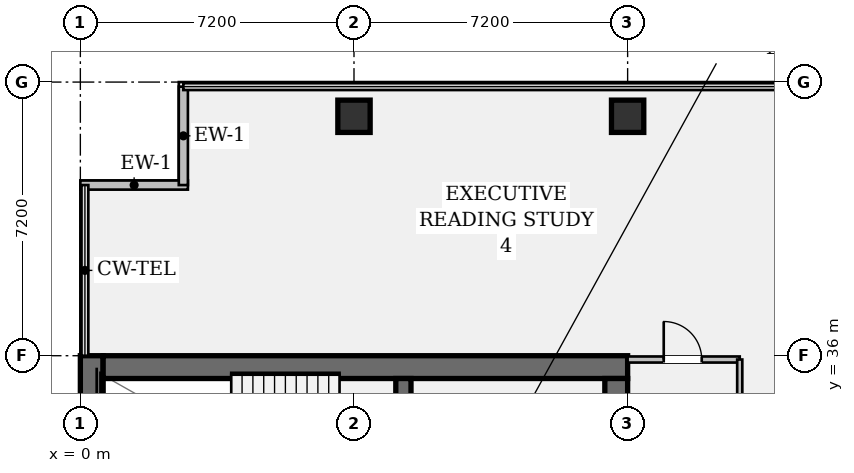
"""IFC4 building model, lengths in metres.
Left out: names, types, materials, properties, quantities, classifications, styles, units other than length and angle.
Written with IfcOpenShell. Run it as: python <this file> out.ifc"""

import sys

from ifc_helpers import new_model, si_unit, direction, frame, frame_2d, origin, origin_2d, place, context, subcontext, project, spatial, rectangle, hollow_rectangle, extrude, element, fill, save


model = new_model("IFC4")
c1 = context("Model", 3, precision=1e-05, world=origin(), true_north=direction((0.0, 1.0)))
c2 = subcontext(c1, "Body", "Model", "MODEL_VIEW")
j1 = project(units=[si_unit("LENGTHUNIT", "METRE"), si_unit("PLANEANGLEUNIT", "RADIAN")], contexts=[c1])
p1 = place(None, origin())
s1 = spatial("IfcSite", under=j1, at=p1, CompositionType="ELEMENT")
p2 = place(p1, origin())
s2 = spatial("IfcBuilding", under=s1, at=p2, CompositionType="ELEMENT")
p3 = place(p2, frame((0.0, 0.0, 148.4)))
s3 = spatial("IfcBuildingStorey", under=s2, at=p3, CompositionType="ELEMENT", Elevation=148.4)
p4 = place(p3, frame((0.3, 7.2, 0.0), z_axis=(0.0, 0.0, 1.0), x_axis=(0.0, 1.0, 0.0)))
e1 = element("IfcWall", 1, at=p4, inside=s3, PredefinedType="SHEAR", context=c2, shape_type="SweptSolid", body=[
    extrude(rectangle(XDim=28.8, YDim=0.6, at=frame_2d((14.4, 0.0))), origin(), (0.0, 0.0, 1.0), 3.58),
])
p5 = place(p3, frame((0.6, 35.7, 0.0), z_axis=(0.0, 0.0, 1.0), x_axis=(1.0, 0.0, 0.0)))
e2 = element("IfcWall", 2, at=p5, inside=s3, PredefinedType="SHEAR", context=c2, shape_type="SweptSolid", body=[
    extrude(rectangle(XDim=13.8, YDim=0.6, at=frame_2d((6.9, 0.0))), origin(), (0.0, 0.0, 1.0), 3.58),
])
p6 = place(p3, frame((14.1, 35.4, 0.0), z_axis=(0.0, 0.0, 1.0), x_axis=(0.0, -1.0, 0.0)))
e3 = element("IfcWall", 3, at=p6, inside=s3, PredefinedType="SHEAR", context=c2, shape_type="SweptSolid", body=[
    extrude(rectangle(XDim=27.6, YDim=0.6, at=frame_2d((13.8, 0.0))), origin(), (0.0, 0.0, 1.0), 3.58),
])
p7 = place(p6, frame((1.3, 0.0, 0.0)))
e4 = element("IfcOpeningElement", 4, at=p7, cuts=e3, PredefinedType="OPENING", context=c2, shape_type="SweptSolid", body=[
    extrude(rectangle(XDim=1.2, YDim=2.15, at=frame_2d((0.6, 1.075))), frame((0.0, 0.312, 0.0), z_axis=(0.0, -1.0, 0.0), x_axis=(1.0, 0.0, 0.0)), (0.0, 0.0, 1.0), 0.624),
])
p8 = place(p6, frame((25.25, 0.0, 0.0)))
e5 = element("IfcOpeningElement", 5, at=p8, cuts=e3, PredefinedType="OPENING", context=c2, shape_type="SweptSolid", body=[
    extrude(rectangle(XDim=1.2, YDim=2.15, at=frame_2d((0.6, 1.075))), frame((0.0, 0.312, 0.0), z_axis=(0.0, -1.0, 0.0), x_axis=(1.0, 0.0, 0.0)), (0.0, 0.0, 1.0), 0.624),
])
p9 = place(p6, frame((14.6, 0.0, 0.0)))
e6 = element("IfcOpeningElement", 6, at=p9, cuts=e3, PredefinedType="OPENING", context=c2, shape_type="SweptSolid", body=[
    extrude(rectangle(XDim=1.6, YDim=2.2, at=frame_2d((0.8, 1.1))), frame((0.0, 0.312, 0.0), z_axis=(0.0, -1.0, 0.0), x_axis=(1.0, 0.0, 0.0)), (0.0, 0.0, 1.0), 0.624),
])
p10 = place(p3, frame((8.5, 31.72, 0.0), z_axis=(0.0, 0.0, 1.0), x_axis=(0.0, 1.0, 0.0)))
e7 = element("IfcWall", 7, at=p10, inside=s3, PredefinedType="SHEAR", context=c2, shape_type="SweptSolid", body=[
    extrude(rectangle(XDim=3.68, YDim=0.4, at=frame_2d((1.84, 0.0))), origin(), (0.0, 0.0, 1.0), 3.58),
])
p11 = place(p10, frame((0.9, 0.0, 0.0)))
e8 = element("IfcOpeningElement", 8, at=p11, cuts=e7, PredefinedType="OPENING", context=c2, shape_type="SweptSolid", body=[
    extrude(rectangle(XDim=1.1, YDim=2.15, at=frame_2d((0.55, 1.075))), frame((0.0, 0.212, 0.0), z_axis=(0.0, -1.0, 0.0), x_axis=(1.0, 0.0, 0.0)), (0.0, 0.0, 1.0), 0.424),
])
for number, where, z_axis, x_axis in (
    (9, (7.2, 42.3, 0.0), (0.0, 0.0, 1.0), (1.0, 0.0, 0.0)),
    (10, (14.4, 42.3, 0.0), (0.0, 0.0, 1.0), (1.0, 0.0, 0.0)),
):
    element("IfcColumn", number, at=place(p3, frame(where, z_axis=z_axis, x_axis=x_axis)), inside=s3, PredefinedType="COLUMN", context=c2, shape_type="SweptSolid", body=[
        extrude(hollow_rectangle(XDim=0.85, YDim=0.85, WallThickness=0.05, at=origin_2d()), origin(), (0.0, 0.0, 1.0), 3.58),
    ])
p12 = place(p3, frame((0.0, 40.49, 0.0), z_axis=(0.0, 0.0, 1.0), x_axis=(1.0, 0.0, 0.0)))
e11 = element("IfcWall", 11, at=p12, inside=s3, PredefinedType="STANDARD", context=c2, shape_type="SweptSolid", body=[
    extrude(rectangle(XDim=2.83, YDim=0.24, at=frame_2d((1.415, 0.0))), origin(), (0.0, 0.0, 1.0), 3.58),
])
p13 = place(p3, frame((2.71, 40.49, 0.0), z_axis=(0.0, 0.0, 1.0), x_axis=(0.0, 1.0, 0.0)))
e12 = element("IfcWall", 12, at=p13, inside=s3, PredefinedType="STANDARD", context=c2, shape_type="SweptSolid", body=[
    extrude(rectangle(XDim=2.59, YDim=0.24, at=frame_2d((1.295, 0.0))), origin(), (0.0, 0.0, 1.0), 3.58),
])
p14 = place(p3, frame((14.4, 35.9, 0.0), z_axis=(0.0, 0.0, 1.0), x_axis=(1.0, 0.0, 0.0)))
e13 = element("IfcWall", 13, at=p14, inside=s3, PredefinedType="PARTITIONING", context=c2, shape_type="SweptSolid", body=[
    extrude(rectangle(XDim=2.95, YDim=0.16, at=frame_2d((1.475, 0.0))), origin(), (0.0, 0.0, 1.0), 2.869),
])
p15 = place(p14, frame((0.95, 0.0, 0.0)))
e14 = element("IfcOpeningElement", 14, at=p15, cuts=e13, PredefinedType="OPENING", context=c2, shape_type="SweptSolid", body=[
    extrude(rectangle(XDim=1.0, YDim=2.15, at=frame_2d((0.5, 1.075))), frame((0.0, 0.092, 0.0), z_axis=(0.0, -1.0, 0.0), x_axis=(1.0, 0.0, 0.0)), (0.0, 0.0, 1.0), 0.184),
])
p16 = place(p3, frame((17.35, 20.7, 0.0), z_axis=(0.0, 0.0, 1.0), x_axis=(0.0, 1.0, 0.0)))
e15 = element("IfcWall", 15, at=p16, inside=s3, PredefinedType="PARTITIONING", context=c2, shape_type="SweptSolid", body=[
    extrude(rectangle(XDim=15.2, YDim=0.135, at=frame_2d((7.6, 0.0))), origin(), (0.0, 0.0, 1.0), 2.869),
])
p17 = place(p16, frame((5.2, 0.0, 0.0)))
e16 = element("IfcOpeningElement", 16, at=p17, cuts=e15, PredefinedType="OPENING", context=c2, shape_type="SweptSolid", body=[
    extrude(rectangle(XDim=1.08, YDim=2.15, at=frame_2d((0.54, 1.075))), frame((0.0, 0.08, 0.0), z_axis=(0.0, -1.0, 0.0), x_axis=(1.0, 0.0, 0.0)), (0.0, 0.0, 1.0), 0.159),
])
p18 = place(p16, frame((10.6, 0.0, 0.0)))
e17 = element("IfcOpeningElement", 17, at=p18, cuts=e15, PredefinedType="OPENING", context=c2, shape_type="SweptSolid", body=[
    extrude(rectangle(XDim=1.0, YDim=2.15, at=frame_2d((0.5, 1.075))), frame((0.0, 0.08, 0.0), z_axis=(0.0, -1.0, 0.0), x_axis=(1.0, 0.0, 0.0)), (0.0, 0.0, 1.0), 0.159),
])
p19 = place(p15, origin())
e18 = element("IfcDoor", 18, at=p19, inside=s3, OperationType="SINGLE_SWING_LEFT", PredefinedType="DOOR", context=c2, shape_type="SweptSolid", body=[
    extrude(rectangle(XDim=1.0, YDim=2.15, at=frame_2d((0.5, 1.075))), frame((0.0, 0.025, 0.0), z_axis=(0.0, -1.0, 0.0), x_axis=(1.0, 0.0, 0.0)), (0.0, 0.0, 1.0), 0.05),
])
fill(e14, e18)
save(model, sys.argv[1])
